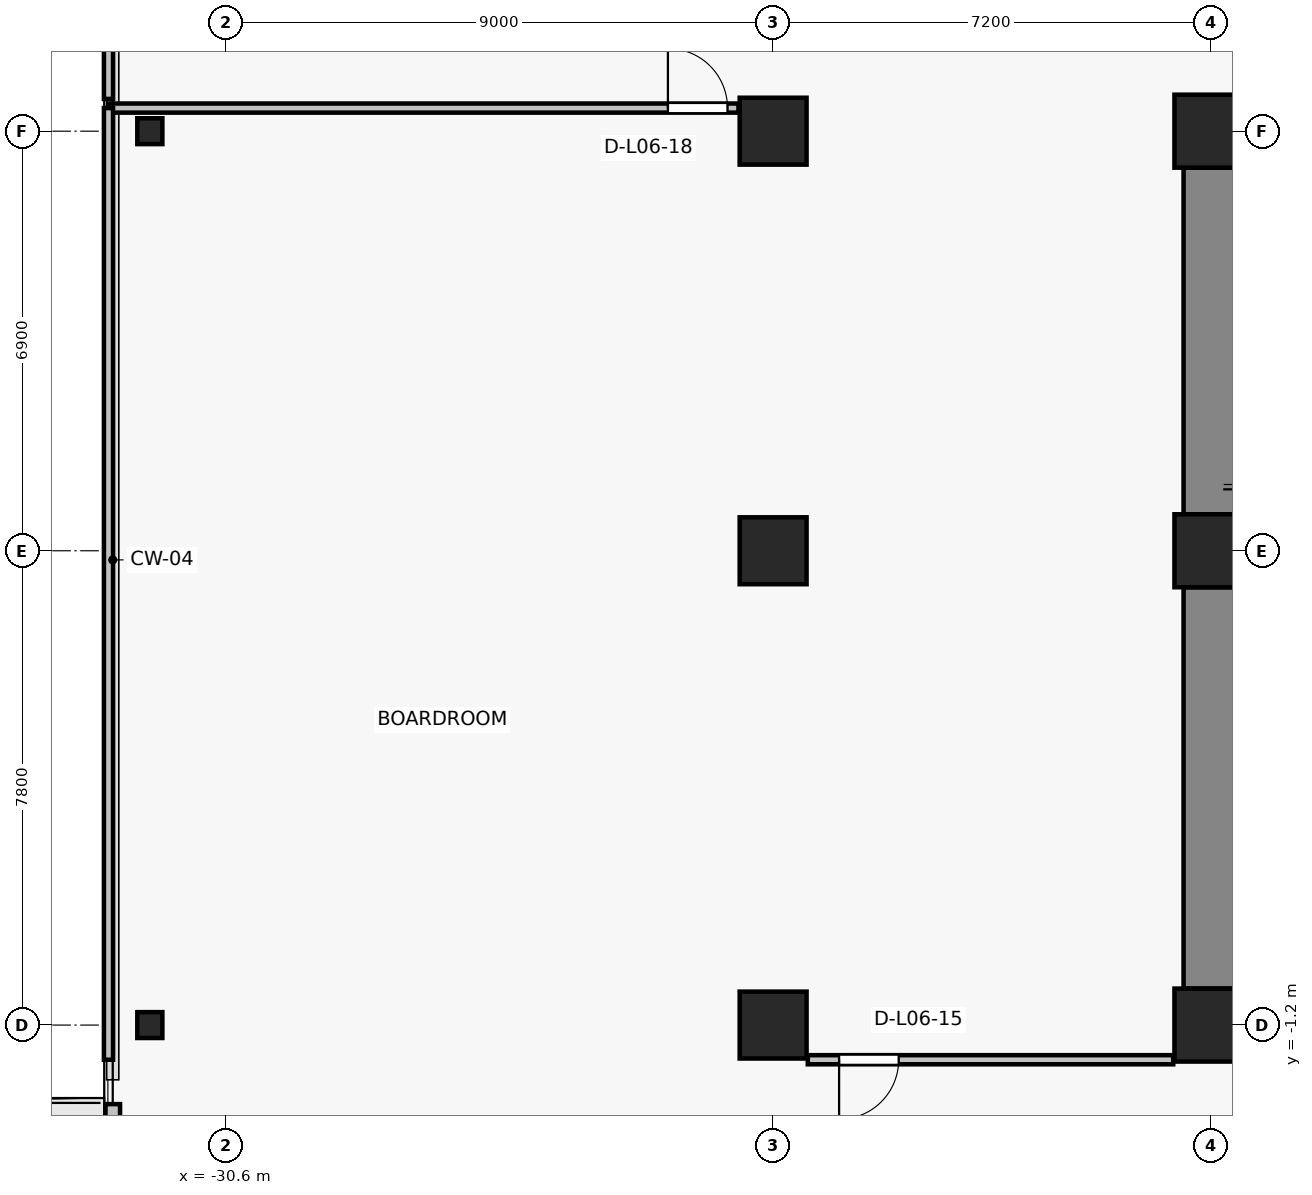
"""IFC4 building model, lengths in metres.
Left out: names, types, materials, properties, quantities, classifications, styles, units other than length and angle.
Written with IfcOpenShell. Run it as: python <this file> out.ifc"""

import sys

from ifc_helpers import new_model, si_unit, direction, frame, frame_2d, origin, origin_2d, place, context, subcontext, project, spatial, rectangle, i_section, extrude, source, transform, mapped, element, fill, save


model = new_model("IFC4")
c1 = context("Model", 3, precision=1e-05, world=origin(), true_north=direction((0.0, 1.0)))
c2 = subcontext(c1, "Body", "Model", "MODEL_VIEW")
j1 = project(units=[si_unit("LENGTHUNIT", "METRE"), si_unit("PLANEANGLEUNIT", "RADIAN")], contexts=[c1])
p1 = place(None, origin())
s1 = spatial("IfcSite", under=j1, at=p1, CompositionType="ELEMENT")
p2 = place(p1, origin())
s2 = spatial("IfcBuilding", under=s1, at=p2, CompositionType="ELEMENT")
p3 = place(p2, frame((0.0, 0.0, 27.4)))
s3 = spatial("IfcBuildingStorey", under=s2, at=p3, CompositionType="ELEMENT", Elevation=27.4)
for number, where, z_axis, x_axis in (
    (1, (-14.4, -1.2, 0.0), (0.0, 0.0, 1.0), (1.0, 0.0, 0.0)),
    (2, (-14.4, 6.6, 0.0), (0.0, 0.0, 1.0), (1.0, 0.0, 0.0)),
    (3, (-14.4, 13.5, 0.0), (0.0, 0.0, 1.0), (1.0, 0.0, 0.0)),
):
    element("IfcColumn", number, at=place(p3, frame(where, z_axis=z_axis, x_axis=x_axis)), inside=s3, PredefinedType="COLUMN", context=c2, shape_type="SweptSolid", body=[
        extrude(rectangle(XDim=1.2, YDim=1.2, at=origin_2d()), origin(), (0.0, 0.0, 1.0), 3.3),
    ])
for number, where, z_axis, x_axis in (
    (4, (-21.6, -1.2, 0.0), (0.0, 0.0, 1.0), (1.0, 0.0, 0.0)),
    (5, (-21.6, 6.6, 0.0), (0.0, 0.0, 1.0), (1.0, 0.0, 0.0)),
    (6, (-21.6, 13.5, 0.0), (0.0, 0.0, 1.0), (1.0, 0.0, 0.0)),
):
    element("IfcColumn", number, at=place(p3, frame(where, z_axis=z_axis, x_axis=x_axis)), inside=s3, PredefinedType="COLUMN", context=c2, shape_type="SweptSolid", body=[
        extrude(rectangle(XDim=1.1, YDim=1.1, at=origin_2d()), origin(), (0.0, 0.0, 1.0), 3.3),
    ])
for number, where, z_axis, x_axis in (
    (7, (-31.85, -1.2, 0.0), (0.0, 0.0, 1.0), (1.0, 0.0, 0.0)),
    (8, (-31.85, 13.5, 0.0), (0.0, 0.0, 1.0), (1.0, 0.0, 0.0)),
):
    element("IfcColumn", number, at=place(p3, frame(where, z_axis=z_axis, x_axis=x_axis)), inside=s3, PredefinedType="COLUMN", context=c2, shape_type="SweptSolid", body=[
        extrude(i_section(OverallWidth=0.412, OverallDepth=0.425, WebThickness=0.026, FlangeThickness=0.039, FilletRadius=0.015, at=origin_2d()), origin(), (0.0, 0.0, 1.0), 3.3),
    ])
p4 = place(p3, frame((-14.4, -0.6, 0.0), z_axis=(0.0, 0.0, 1.0), x_axis=(0.0, 1.0, 0.0)))
e9 = element("IfcWall", 9, at=p4, inside=s3, PredefinedType="SHEAR", context=c2, shape_type="SweptSolid", body=[
    extrude(rectangle(XDim=6.6, YDim=0.9, at=frame_2d((3.3, 0.0))), origin(), (0.0, 0.0, 1.0), 3.075),
])
p5 = place(p3, frame((-14.4, 7.2, 0.0), z_axis=(0.0, 0.0, 1.0), x_axis=(0.0, 1.0, 0.0)))
e10 = element("IfcWall", 10, at=p5, inside=s3, PredefinedType="SHEAR", context=c2, shape_type="SweptSolid", body=[
    extrude(rectangle(XDim=5.7, YDim=0.9, at=frame_2d((2.85, 0.0))), origin(), (0.0, 0.0, 1.0), 3.075),
])
p6 = place(p3, frame((-32.46, -8.3, 0.0), z_axis=(0.0, 0.0, 1.0), x_axis=(0.0, 1.0, 0.0)))
e11 = element("IfcWall", 11, at=p6, inside=s3, PredefinedType="SOLIDWALL", context=c2, shape_type="SweptSolid", body=[
    extrude(rectangle(XDim=5.8, YDim=0.24, at=frame_2d((2.9, 0.0))), origin(), (0.0, 0.0, 1.0), 3.075),
])
p7 = place(p6, frame((0.696, 0.0, 0.0)))
e12 = element("IfcOpeningElement", 12, at=p7, cuts=e11, PredefinedType="OPENING", context=c2, shape_type="SweptSolid", body=[
    extrude(rectangle(XDim=1.0, YDim=2.2, at=frame_2d((0.5, 1.1))), frame((0.0, 0.13, 0.0), z_axis=(0.0, -1.0, 0.0), x_axis=(1.0, 0.0, 0.0)), (0.0, 0.0, 1.0), 0.26),
])
p8 = place(p6, frame((2.046, 0.0, 0.85)))
e13 = element("IfcOpeningElement", 13, at=p8, cuts=e11, PredefinedType="OPENING", context=c2, shape_type="SweptSolid", body=[
    extrude(rectangle(XDim=0.9, YDim=1.35, at=frame_2d((0.45, 0.675))), frame((0.0, 0.13, 0.0), z_axis=(0.0, -1.0, 0.0), x_axis=(1.0, 0.0, 0.0)), (0.0, 0.0, 1.0), 0.26),
])
p9 = place(p3, frame((-15.02, -1.77, 0.0), z_axis=(0.0, 0.0, 1.0), x_axis=(-1.0, 0.0, 0.0)))
e14 = element("IfcWall", 14, at=p9, inside=s3, PredefinedType="PARTITIONING", context=c2, shape_type="SweptSolid", body=[
    extrude(rectangle(XDim=6.01, YDim=0.15, at=frame_2d((3.005, 0.0))), origin(), (0.0, 0.0, 1.0), 3.075),
])
p10 = place(p9, frame((4.515, 0.0, 0.0)))
e15 = element("IfcOpeningElement", 15, at=p10, cuts=e14, PredefinedType="OPENING", context=c2, shape_type="SweptSolid", body=[
    extrude(rectangle(XDim=0.98, YDim=2.15, at=frame_2d((0.49, 1.075))), frame((0.0, 0.085, 0.0), z_axis=(0.0, -1.0, 0.0), x_axis=(1.0, 0.0, 0.0)), (0.0, 0.0, 1.0), 0.17),
])
p11 = place(p3, frame((-32.53, 13.88, 0.0), z_axis=(0.0, 0.0, 1.0), x_axis=(1.0, 0.0, 0.0)))
e16 = element("IfcWall", 16, at=p11, inside=s3, PredefinedType="PARTITIONING", context=c2, shape_type="SweptSolid", body=[
    extrude(rectangle(XDim=10.36, YDim=0.15, at=frame_2d((5.18, 0.0))), origin(), (0.0, 0.0, 1.0), 3.075),
])
p12 = place(p11, frame((9.2, 0.0, 0.0)))
e17 = element("IfcOpeningElement", 17, at=p12, cuts=e16, PredefinedType="OPENING", context=c2, shape_type="SweptSolid", body=[
    extrude(rectangle(XDim=0.98, YDim=2.15, at=frame_2d((0.49, 1.075))), frame((0.0, 0.085, 0.0), z_axis=(0.0, -1.0, 0.0), x_axis=(1.0, 0.0, 0.0)), (0.0, 0.0, 1.0), 0.17),
])
p13 = place(p3, frame((-32.53, -1.77, 0.0), z_axis=(0.0, 0.0, 1.0), x_axis=(0.0, 1.0, 0.0)))
e18 = element("IfcWall", 18, at=p13, inside=s3, PredefinedType="PARTITIONING", context=c2, shape_type="SweptSolid", body=[
    extrude(rectangle(XDim=15.65, YDim=0.15, at=frame_2d((7.825, 0.0))), origin(), (0.0, 0.0, 1.0), 3.075),
])
p14 = place(p3, frame((-32.53, 14.03, 0.0), z_axis=(0.0, 0.0, 1.0), x_axis=(0.0, 1.0, 0.0)))
e19 = element("IfcWall", 19, at=p14, inside=s3, PredefinedType="PARTITIONING", context=c2, shape_type="SweptSolid", body=[
    extrude(rectangle(XDim=4.1, YDim=0.15, at=frame_2d((2.05, 0.0))), origin(), (0.0, 0.0, 1.0), 3.075),
])
m1 = source(origin(), c2, "Body", "SweptSolid", [
    extrude(rectangle(XDim=0.98, YDim=2.15, at=frame_2d((0.49, 1.075))), frame((0.0, 0.025, 0.0), z_axis=(0.0, -1.0, 0.0), x_axis=(1.0, 0.0, 0.0)), (0.0, 0.0, 1.0), 0.05),
])
p15 = place(p10, origin())
e20 = element("IfcDoor", 20, at=p15, inside=s3, OperationType="SINGLE_SWING_RIGHT", PredefinedType="DOOR", context=c2, shape_type="MappedRepresentation", body=[
    mapped(m1, transform((0.0, 0.0, 0.0), x_axis=(1.0, 0.0, 0.0), y_axis=(0.0, 1.0, 0.0), z_axis=(0.0, 0.0, 1.0), scale=1.0)),
])
fill(e15, e20)
p16 = place(p12, origin())
e21 = element("IfcDoor", 21, at=p16, inside=s3, OperationType="SINGLE_SWING_LEFT", PredefinedType="DOOR", context=c2, shape_type="MappedRepresentation", body=[
    mapped(m1, transform((0.0, 0.0, 0.0), x_axis=(1.0, 0.0, 0.0), y_axis=(0.0, 1.0, 0.0), z_axis=(0.0, 0.0, 1.0), scale=1.0)),
])
fill(e17, e21)
save(model, sys.argv[1])
